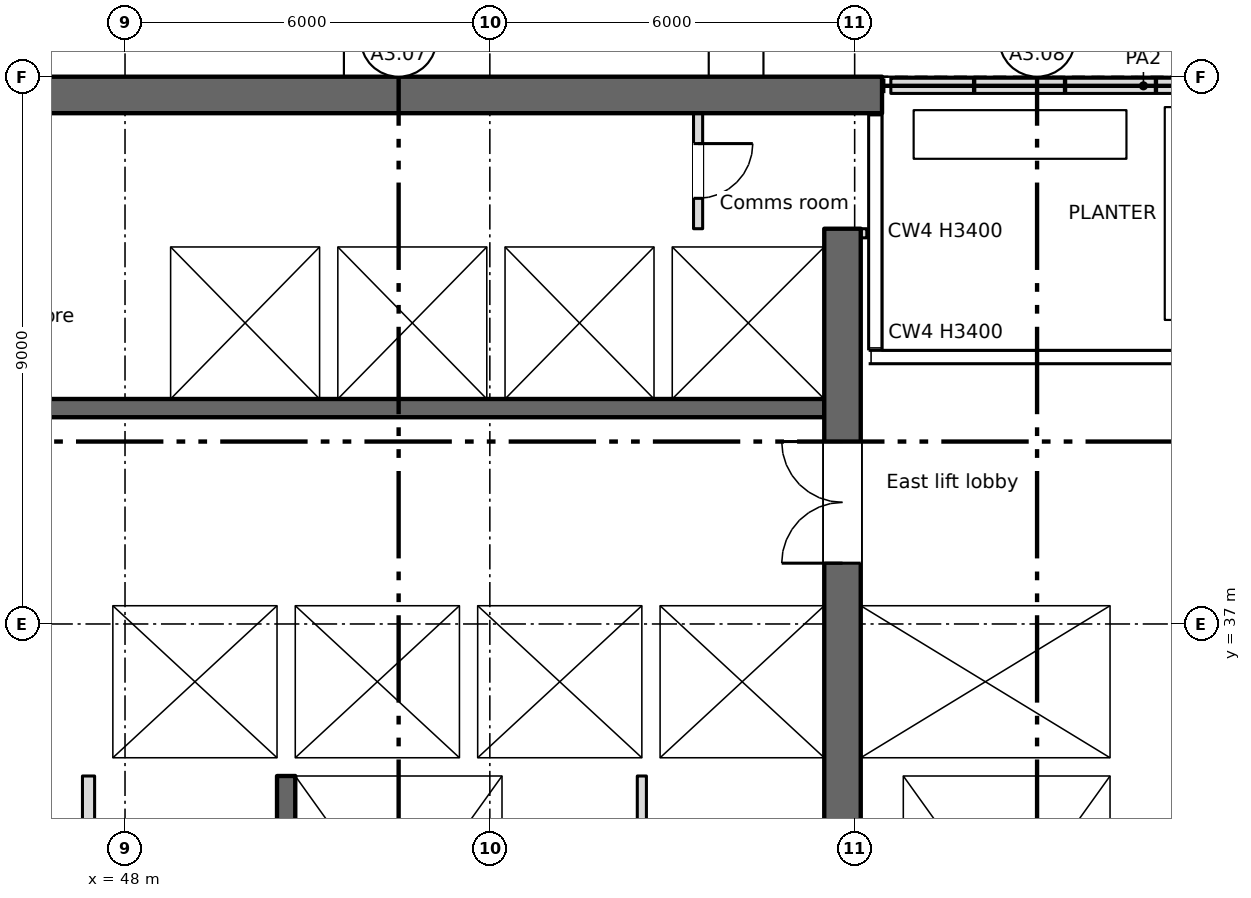
"""IFC4 building model, lengths in metres.
Left out: names, types, materials, properties, quantities, classifications, styles, units other than length and angle.
Written with IfcOpenShell. Run it as: python <this file> out.ifc"""

import sys

from ifc_helpers import new_model, si_unit, direction, frame, frame_2d, origin, place, context, subcontext, project, spatial, rectangle, extrude, element, fill, save


model = new_model("IFC4")
c1 = context("Model", 3, precision=1e-05, world=origin(), true_north=direction((0.0, 1.0)))
c2 = subcontext(c1, "Body", "Model", "MODEL_VIEW")
j1 = project(units=[si_unit("LENGTHUNIT", "METRE"), si_unit("PLANEANGLEUNIT", "RADIAN")], contexts=[c1])
p1 = place(None, origin())
s1 = spatial("IfcSite", under=j1, at=p1, CompositionType="ELEMENT")
p2 = place(p1, origin())
s2 = spatial("IfcBuilding", under=s1, at=p2, CompositionType="ELEMENT")
p3 = place(p2, frame((0.0, 0.0, 231.75)))
s3 = spatial("IfcBuildingStorey", under=s2, at=p3, CompositionType="ELEMENT", Elevation=231.75)
p4 = place(p3, frame((11.55, 45.7, 0.0), z_axis=(0.0, 0.0, 1.0), x_axis=(1.0, 0.0, 0.0)))
e1 = element("IfcWall", 1, at=p4, inside=s3, PredefinedType="SHEAR", context=c2, shape_type="SweptSolid", body=[
    extrude(rectangle(XDim=48.9, YDim=0.6, at=frame_2d((24.45, 0.0))), origin(), (0.0, 0.0, 1.0), 3.4),
])
p5 = place(p4, frame((1.2, 0.0, 0.6)))
e2 = element("IfcOpeningElement", 2, at=p5, cuts=e1, PredefinedType="OPENING", context=c2, shape_type="SweptSolid", body=[
    extrude(rectangle(XDim=0.6, YDim=2.4, at=frame_2d((0.3, 1.2))), frame((0.0, 0.31, 0.0), z_axis=(0.0, -1.0, 0.0), x_axis=(1.0, 0.0, 0.0)), (0.0, 0.0, 1.0), 0.62),
])
p6 = place(p3, frame((60.595, 45.85, 0.0), z_axis=(0.0, 0.0, 1.0), x_axis=(1.0, 0.0, 0.0)))
e3 = element("IfcWall", 3, at=p6, inside=s3, PredefinedType="PARAPET", context=c2, shape_type="SweptSolid", body=[
    extrude(rectangle(XDim=5.73, YDim=0.25, at=frame_2d((2.865, 0.0))), origin(), (0.0, 0.0, 1.0), 0.3),
])
p7 = place(p3, frame((64.35, 34.8, 0.0), z_axis=(0.0, 0.0, 1.0), x_axis=(0.0, 1.0, 0.0)))
e4 = element("IfcWall", 4, at=p7, inside=s3, PredefinedType="SHEAR", context=c2, shape_type="SweptSolid", body=[
    extrude(rectangle(XDim=6.45, YDim=0.3, at=frame_2d((3.225, 0.0))), origin(), (0.0, 0.0, 1.0), 3.4),
])
p8 = place(p3, frame((59.8, 28.4, 0.0), z_axis=(0.0, 0.0, 1.0), x_axis=(0.0, 1.0, 0.0)))
e5 = element("IfcWall", 5, at=p8, inside=s3, PredefinedType="SHEAR", context=c2, shape_type="SweptSolid", body=[
    extrude(rectangle(XDim=15.1, YDim=0.6, at=frame_2d((7.55, 0.0))), origin(), (0.0, 0.0, 1.0), 3.4),
])
p9 = place(p8, frame((9.6, 0.0, 0.0)))
e6 = element("IfcOpeningElement", 6, at=p9, cuts=e5, PredefinedType="OPENING", context=c2, shape_type="SweptSolid", body=[
    extrude(rectangle(XDim=2.0, YDim=2.1, at=frame_2d((1.0, 1.05))), frame((0.0, 0.31, 0.0), z_axis=(0.0, -1.0, 0.0), x_axis=(1.0, 0.0, 0.0)), (0.0, 0.0, 1.0), 0.62),
])
p10 = place(p3, frame((50.65, 34.5, 0.0), z_axis=(0.0, 0.0, 1.0), x_axis=(0.0, -1.0, 0.0)))
e7 = element("IfcWall", 7, at=p10, inside=s3, PredefinedType="SHEAR", context=c2, shape_type="SweptSolid", body=[
    extrude(rectangle(XDim=6.1, YDim=0.3, at=frame_2d((3.05, 0.0))), origin(), (0.0, 0.0, 1.0), 3.4),
])
p11 = place(p10, frame((4.95, 0.0, 0.0)))
e8 = element("IfcOpeningElement", 8, at=p11, cuts=e7, PredefinedType="OPENING", context=c2, shape_type="SweptSolid", body=[
    extrude(rectangle(XDim=1.1, YDim=2.1, at=frame_2d((0.55, 1.05))), frame((0.0, 0.16, 0.0), z_axis=(0.0, -1.0, 0.0), x_axis=(1.0, 0.0, 0.0)), (0.0, 0.0, 1.0), 0.32),
])
p12 = place(p3, frame((54.35, 28.4, 0.0), z_axis=(0.0, 0.0, 1.0), x_axis=(0.0, 1.0, 0.0)))
e9 = element("IfcWall", 9, at=p12, inside=s3, PredefinedType="SHEAR", context=c2, shape_type="SweptSolid", body=[
    extrude(rectangle(XDim=6.1, YDim=0.3, at=frame_2d((3.05, 0.0))), origin(), (0.0, 0.0, 1.0), 3.4),
])
p13 = place(p3, frame((60.45, 28.4, 0.0), z_axis=(0.0, 0.0, 1.0), x_axis=(0.0, 1.0, 0.0)))
e10 = element("IfcWall", 10, at=p13, inside=s3, PredefinedType="SHEAR", context=c2, shape_type="SweptSolid", body=[
    extrude(rectangle(XDim=6.1, YDim=0.7, at=frame_2d((3.05, 0.0))), origin(), (0.0, 0.0, 1.0), 3.4),
])
p14 = place(p3, frame((64.35, 28.4, 0.0), z_axis=(0.0, 0.0, 1.0), x_axis=(0.0, 1.0, 0.0)))
e11 = element("IfcWall", 11, at=p14, inside=s3, PredefinedType="SHEAR", context=c2, shape_type="SweptSolid", body=[
    extrude(rectangle(XDim=6.1, YDim=0.3, at=frame_2d((3.05, 0.0))), origin(), (0.0, 0.0, 1.0), 3.4),
])
p15 = place(p3, frame((47.3, 34.65, 0.0), z_axis=(0.0, 0.0, 1.0), x_axis=(1.0, 0.0, 0.0)))
e12 = element("IfcWall", 12, at=p15, inside=s3, PredefinedType="SHEAR", context=c2, shape_type="SweptSolid", body=[
    extrude(rectangle(XDim=12.2, YDim=0.3, at=frame_2d((6.1, 0.0))), origin(), (0.0, 0.0, 1.0), 3.4),
])
p16 = place(p15, frame((1.3, 0.0, 0.0)))
e13 = element("IfcOpeningElement", 13, at=p16, cuts=e12, PredefinedType="OPENING", context=c2, shape_type="SweptSolid", body=[
    extrude(rectangle(XDim=1.1, YDim=2.1, at=frame_2d((0.55, 1.05))), frame((0.0, 0.16, 0.0), z_axis=(0.0, -1.0, 0.0), x_axis=(1.0, 0.0, 0.0)), (0.0, 0.0, 1.0), 0.32),
])
p17 = place(p3, frame((60.1, 34.65, 0.0), z_axis=(0.0, 0.0, 1.0), x_axis=(1.0, 0.0, 0.0)))
e14 = element("IfcWall", 14, at=p17, inside=s3, PredefinedType="SHEAR", context=c2, shape_type="SweptSolid", body=[
    extrude(rectangle(XDim=4.4, YDim=0.3, at=frame_2d((2.2, 0.0))), origin(), (0.0, 0.0, 1.0), 3.4),
])
p18 = place(p3, frame((47.3, 37.45, 0.0), z_axis=(0.0, 0.0, 1.0), x_axis=(1.0, 0.0, 0.0)))
e15 = element("IfcWall", 15, at=p18, inside=s3, PredefinedType="SHEAR", context=c2, shape_type="SweptSolid", body=[
    extrude(rectangle(XDim=12.2, YDim=0.3, at=frame_2d((6.1, 0.0))), origin(), (0.0, 0.0, 1.0), 3.4),
])
p19 = place(p18, frame((4.3, 0.0, 0.0)))
e16 = element("IfcOpeningElement", 16, at=p19, cuts=e15, PredefinedType="OPENING", context=c2, shape_type="SweptSolid", body=[
    extrude(rectangle(XDim=1.1, YDim=2.1, at=frame_2d((0.55, 1.05))), frame((0.0, 0.16, 0.0), z_axis=(0.0, -1.0, 0.0), x_axis=(1.0, 0.0, 0.0)), (0.0, 0.0, 1.0), 0.32),
])
p20 = place(p18, frame((7.3, 0.0, 0.0)))
e17 = element("IfcOpeningElement", 17, at=p20, cuts=e15, PredefinedType="OPENING", context=c2, shape_type="SweptSolid", body=[
    extrude(rectangle(XDim=1.1, YDim=2.1, at=frame_2d((0.55, 1.05))), frame((0.0, 0.16, 0.0), z_axis=(0.0, -1.0, 0.0), x_axis=(1.0, 0.0, 0.0)), (0.0, 0.0, 1.0), 0.32),
])
p21 = place(p18, frame((10.3, 0.0, 0.0)))
e18 = element("IfcOpeningElement", 18, at=p21, cuts=e15, PredefinedType="OPENING", context=c2, shape_type="SweptSolid", body=[
    extrude(rectangle(XDim=1.1, YDim=2.1, at=frame_2d((0.55, 1.05))), frame((0.0, 0.16, 0.0), z_axis=(0.0, -1.0, 0.0), x_axis=(1.0, 0.0, 0.0)), (0.0, 0.0, 1.0), 0.32),
])
p22 = place(p3, frame((60.1, 37.45, 0.0), z_axis=(0.0, 0.0, 1.0), x_axis=(1.0, 0.0, 0.0)))
e19 = element("IfcWall", 19, at=p22, inside=s3, PredefinedType="SHEAR", context=c2, shape_type="SweptSolid", body=[
    extrude(rectangle(XDim=4.1, YDim=0.3, at=frame_2d((2.05, 0.0))), origin(), (0.0, 0.0, 1.0), 3.4),
])
p23 = place(p22, frame((1.5, 0.0, 0.0)))
e20 = element("IfcOpeningElement", 20, at=p23, cuts=e19, PredefinedType="OPENING", context=c2, shape_type="SweptSolid", body=[
    extrude(rectangle(XDim=1.1, YDim=2.1, at=frame_2d((0.55, 1.05))), frame((0.0, 0.16, 0.0), z_axis=(0.0, -1.0, 0.0), x_axis=(1.0, 0.0, 0.0)), (0.0, 0.0, 1.0), 0.32),
])
p24 = place(p3, frame((47.55, 34.8, 0.0), z_axis=(0.0, 0.0, 1.0), x_axis=(0.0, 1.0, 0.0)))
e21 = element("IfcWall", 21, at=p24, inside=s3, PredefinedType="SHEAR", context=c2, shape_type="SweptSolid", body=[
    extrude(rectangle(XDim=2.5, YDim=0.5, at=frame_2d((1.25, 0.0))), origin(), (0.0, 0.0, 1.0), 3.4),
])
p25 = place(p3, frame((50.65, 34.8, 0.0), z_axis=(0.0, 0.0, 1.0), x_axis=(0.0, 1.0, 0.0)))
e22 = element("IfcWall", 22, at=p25, inside=s3, PredefinedType="SHEAR", context=c2, shape_type="SweptSolid", body=[
    extrude(rectangle(XDim=2.5, YDim=0.3, at=frame_2d((1.25, 0.0))), origin(), (0.0, 0.0, 1.0), 3.4),
])
p26 = place(p3, frame((18.5, 40.55, 0.0), z_axis=(0.0, 0.0, 1.0), x_axis=(1.0, 0.0, 0.0)))
e23 = element("IfcWall", 23, at=p26, inside=s3, PredefinedType="SHEAR", context=c2, shape_type="SweptSolid", body=[
    extrude(rectangle(XDim=41.0, YDim=0.3, at=frame_2d((20.5, 0.0))), origin(), (0.0, 0.0, 1.0), 3.4),
])
p27 = place(p26, frame((2.15, 0.0, 0.0)))
e24 = element("IfcOpeningElement", 24, at=p27, cuts=e23, PredefinedType="OPENING", context=c2, shape_type="SweptSolid", body=[
    extrude(rectangle(XDim=0.9, YDim=2.1, at=frame_2d((0.45, 1.05))), frame((0.0, 0.16, 0.0), z_axis=(0.0, -1.0, 0.0), x_axis=(1.0, 0.0, 0.0)), (0.0, 0.0, 1.0), 0.32),
])
p28 = place(p26, frame((15.9, 0.0, 0.0)))
e25 = element("IfcOpeningElement", 25, at=p28, cuts=e23, PredefinedType="OPENING", context=c2, shape_type="SweptSolid", body=[
    extrude(rectangle(XDim=0.9, YDim=2.1, at=frame_2d((0.45, 1.05))), frame((0.0, 0.16, 0.0), z_axis=(0.0, -1.0, 0.0), x_axis=(1.0, 0.0, 0.0)), (0.0, 0.0, 1.0), 0.32),
])
p29 = place(p26, frame((21.4, 0.0, 0.0)))
e26 = element("IfcOpeningElement", 26, at=p29, cuts=e23, PredefinedType="OPENING", context=c2, shape_type="SweptSolid", body=[
    extrude(rectangle(XDim=0.9, YDim=2.1, at=frame_2d((0.45, 1.05))), frame((0.0, 0.16, 0.0), z_axis=(0.0, -1.0, 0.0), x_axis=(1.0, 0.0, 0.0)), (0.0, 0.0, 1.0), 0.32),
])
p30 = place(p26, frame((26.9, 0.0, 0.0)))
e27 = element("IfcOpeningElement", 27, at=p30, cuts=e23, PredefinedType="OPENING", context=c2, shape_type="SweptSolid", body=[
    extrude(rectangle(XDim=0.9, YDim=2.1, at=frame_2d((0.45, 1.05))), frame((0.0, 0.16, 0.0), z_axis=(0.0, -1.0, 0.0), x_axis=(1.0, 0.0, 0.0)), (0.0, 0.0, 1.0), 0.32),
])
p31 = place(p26, frame((6.175, 0.0, 0.0)))
e28 = element("IfcOpeningElement", 28, at=p31, cuts=e23, PredefinedType="OPENING", context=c2, shape_type="SweptSolid", body=[
    extrude(rectangle(XDim=1.1, YDim=2.1, at=frame_2d((0.55, 1.05))), frame((0.0, 0.16, 0.0), z_axis=(0.0, -1.0, 0.0), x_axis=(1.0, 0.0, 0.0)), (0.0, 0.0, 1.0), 0.32),
])
p32 = place(p26, frame((8.925, 0.0, 0.0)))
e29 = element("IfcOpeningElement", 29, at=p32, cuts=e23, PredefinedType="OPENING", context=c2, shape_type="SweptSolid", body=[
    extrude(rectangle(XDim=1.1, YDim=2.1, at=frame_2d((0.55, 1.05))), frame((0.0, 0.16, 0.0), z_axis=(0.0, -1.0, 0.0), x_axis=(1.0, 0.0, 0.0)), (0.0, 0.0, 1.0), 0.32),
])
p33 = place(p26, frame((11.675, 0.0, 0.0)))
e30 = element("IfcOpeningElement", 30, at=p33, cuts=e23, PredefinedType="OPENING", context=c2, shape_type="SweptSolid", body=[
    extrude(rectangle(XDim=1.1, YDim=2.1, at=frame_2d((0.55, 1.05))), frame((0.0, 0.16, 0.0), z_axis=(0.0, -1.0, 0.0), x_axis=(1.0, 0.0, 0.0)), (0.0, 0.0, 1.0), 0.32),
])
p34 = place(p26, frame((30.925, 0.0, 0.0)))
e31 = element("IfcOpeningElement", 31, at=p34, cuts=e23, PredefinedType="OPENING", context=c2, shape_type="SweptSolid", body=[
    extrude(rectangle(XDim=1.1, YDim=2.1, at=frame_2d((0.55, 1.05))), frame((0.0, 0.16, 0.0), z_axis=(0.0, -1.0, 0.0), x_axis=(1.0, 0.0, 0.0)), (0.0, 0.0, 1.0), 0.32),
])
p35 = place(p26, frame((33.675, 0.0, 0.0)))
e32 = element("IfcOpeningElement", 32, at=p35, cuts=e23, PredefinedType="OPENING", context=c2, shape_type="SweptSolid", body=[
    extrude(rectangle(XDim=1.1, YDim=2.1, at=frame_2d((0.55, 1.05))), frame((0.0, 0.16, 0.0), z_axis=(0.0, -1.0, 0.0), x_axis=(1.0, 0.0, 0.0)), (0.0, 0.0, 1.0), 0.32),
])
p36 = place(p26, frame((36.375, 0.0, 0.0)))
e33 = element("IfcOpeningElement", 33, at=p36, cuts=e23, PredefinedType="OPENING", context=c2, shape_type="SweptSolid", body=[
    extrude(rectangle(XDim=1.2, YDim=2.1, at=frame_2d((0.6, 1.05))), frame((0.0, 0.16, 0.0), z_axis=(0.0, -1.0, 0.0), x_axis=(1.0, 0.0, 0.0)), (0.0, 0.0, 1.0), 0.32),
])
p37 = place(p26, frame((39.15, 0.0, 0.0)))
e34 = element("IfcOpeningElement", 34, at=p37, cuts=e23, PredefinedType="OPENING", context=c2, shape_type="SweptSolid", body=[
    extrude(rectangle(XDim=1.2, YDim=2.1, at=frame_2d((0.6, 1.05))), frame((0.0, 0.16, 0.0), z_axis=(0.0, -1.0, 0.0), x_axis=(1.0, 0.0, 0.0)), (0.0, 0.0, 1.0), 0.32),
])
p38 = place(p3, frame((18.5, 43.35, 0.0), z_axis=(0.0, 0.0, 1.0), x_axis=(1.0, 0.0, 0.0)))
e35 = element("IfcWall", 35, at=p38, inside=s3, PredefinedType="SHEAR", context=c2, shape_type="SweptSolid", body=[
    extrude(rectangle(XDim=41.0, YDim=0.3, at=frame_2d((20.5, 0.0))), origin(), (0.0, 0.0, 1.0), 3.4),
])
for number, where, z_axis, x_axis in (
    (36, (53.65, 34.8, 0.0), (0.0, 0.0, 1.0), (0.0, 1.0, 0.0)),
    (37, (56.65, 34.8, 0.0), (0.0, 0.0, 1.0), (0.0, 1.0, 0.0)),
    (38, (48.6, 40.7, 0.0), (0.0, 0.0, 1.0), (0.0, 1.0, 0.0)),
    (39, (51.35, 40.7, 0.0), (0.0, 0.0, 1.0), (0.0, 1.0, 0.0)),
    (40, (54.1, 40.7, 0.0), (0.0, 0.0, 1.0), (0.0, 1.0, 0.0)),
    (41, (56.85, 40.7, 0.0), (0.0, 0.0, 1.0), (0.0, 1.0, 0.0)),
):
    element("IfcWall", number, at=place(p3, frame(where, z_axis=z_axis, x_axis=x_axis)), inside=s3, PredefinedType="SHEAR", context=c2, shape_type="SweptSolid", body=[
        extrude(rectangle(XDim=2.5, YDim=0.3, at=frame_2d((1.25, 0.0))), origin(), (0.0, 0.0, 1.0), 3.4),
    ])
p39 = place(p3, frame((47.4, 28.4, 0.0), z_axis=(0.0, 0.0, 1.0), x_axis=(0.0, 1.0, 0.0)))
e42 = element("IfcWall", 42, at=p39, inside=s3, PredefinedType="PARTITIONING", context=c2, shape_type="SweptSolid", body=[
    extrude(rectangle(XDim=6.1, YDim=0.2, at=frame_2d((3.05, 0.0))), origin(), (0.0, 0.0, 1.0), 3.4),
])
p40 = place(p3, frame((56.5, 28.4, 0.0), z_axis=(0.0, 0.0, 1.0), x_axis=(0.0, 1.0, 0.0)))
e43 = element("IfcWall", 43, at=p40, inside=s3, PredefinedType="PARTITIONING", context=c2, shape_type="SweptSolid", body=[
    extrude(rectangle(XDim=6.1, YDim=0.15, at=frame_2d((3.05, 0.0))), origin(), (0.0, 0.0, 1.0), 3.4),
])
p41 = place(p3, frame((57.425, 45.4, 0.0), z_axis=(0.0, 0.0, 1.0), x_axis=(0.0, -1.0, 0.0)))
e44 = element("IfcWall", 44, at=p41, inside=s3, PredefinedType="PARTITIONING", context=c2, shape_type="SweptSolid", body=[
    extrude(rectangle(XDim=1.9, YDim=0.15, at=frame_2d((0.95, 0.0))), origin(), (0.0, 0.0, 1.0), 3.4),
])
p42 = place(p41, frame((0.5, 0.0, 0.0)))
e45 = element("IfcOpeningElement", 45, at=p42, cuts=e44, PredefinedType="OPENING", context=c2, shape_type="SweptSolid", body=[
    extrude(rectangle(XDim=0.9, YDim=2.1, at=frame_2d((0.45, 1.05))), frame((0.0, 0.085, 0.0), z_axis=(0.0, -1.0, 0.0), x_axis=(1.0, 0.0, 0.0)), (0.0, 0.0, 1.0), 0.17),
])
p43 = place(p3, frame((60.15, 43.35, 0.0), z_axis=(0.0, 0.0, 1.0), x_axis=(0.0, 1.0, 0.0)))
e46 = element("IfcWall", 46, at=p43, inside=s3, PredefinedType="PARTITIONING", context=c2, shape_type="SweptSolid", body=[
    extrude(rectangle(XDim=0.15, YDim=0.1, at=frame_2d((0.075, 0.0))), origin(), (0.0, 0.0, 1.0), 3.4),
])
p44 = place(p42, origin())
e47 = element("IfcDoor", 47, at=p44, inside=s3, OperationType="SINGLE_SWING_LEFT", PredefinedType="DOOR", context=c2, shape_type="SweptSolid", body=[
    extrude(rectangle(XDim=0.9, YDim=2.1, at=frame_2d((0.45, 1.05))), frame((0.0, 0.025, 0.0), z_axis=(0.0, -1.0, 0.0), x_axis=(1.0, 0.0, 0.0)), (0.0, 0.0, 1.0), 0.05),
])
fill(e45, e47)
p45 = place(p19, origin())
e48 = element("IfcDoor", 48, at=p45, inside=s3, OperationType="SLIDING_TO_LEFT", PredefinedType="DOOR", context=c2, shape_type="SweptSolid", body=[
    extrude(rectangle(XDim=1.1, YDim=2.1, at=frame_2d((0.55, 1.05))), frame((0.0, 0.025, 0.0), z_axis=(0.0, -1.0, 0.0), x_axis=(1.0, 0.0, 0.0)), (0.0, 0.0, 1.0), 0.05),
])
fill(e16, e48)
p46 = place(p20, origin())
e49 = element("IfcDoor", 49, at=p46, inside=s3, OperationType="SLIDING_TO_LEFT", PredefinedType="DOOR", context=c2, shape_type="SweptSolid", body=[
    extrude(rectangle(XDim=1.1, YDim=2.1, at=frame_2d((0.55, 1.05))), frame((0.0, 0.025, 0.0), z_axis=(0.0, -1.0, 0.0), x_axis=(1.0, 0.0, 0.0)), (0.0, 0.0, 1.0), 0.05),
])
fill(e17, e49)
p47 = place(p21, origin())
e50 = element("IfcDoor", 50, at=p47, inside=s3, OperationType="SLIDING_TO_LEFT", PredefinedType="DOOR", context=c2, shape_type="SweptSolid", body=[
    extrude(rectangle(XDim=1.1, YDim=2.1, at=frame_2d((0.55, 1.05))), frame((0.0, 0.025, 0.0), z_axis=(0.0, -1.0, 0.0), x_axis=(1.0, 0.0, 0.0)), (0.0, 0.0, 1.0), 0.05),
])
fill(e18, e50)
p48 = place(p34, origin())
e51 = element("IfcDoor", 51, at=p48, inside=s3, OperationType="SLIDING_TO_LEFT", PredefinedType="DOOR", context=c2, shape_type="SweptSolid", body=[
    extrude(rectangle(XDim=1.1, YDim=2.1, at=frame_2d((0.55, 1.05))), frame((0.0, 0.025, 0.0), z_axis=(0.0, -1.0, 0.0), x_axis=(1.0, 0.0, 0.0)), (0.0, 0.0, 1.0), 0.05),
])
fill(e31, e51)
p49 = place(p35, origin())
e52 = element("IfcDoor", 52, at=p49, inside=s3, OperationType="SLIDING_TO_LEFT", PredefinedType="DOOR", context=c2, shape_type="SweptSolid", body=[
    extrude(rectangle(XDim=1.1, YDim=2.1, at=frame_2d((0.55, 1.05))), frame((0.0, 0.025, 0.0), z_axis=(0.0, -1.0, 0.0), x_axis=(1.0, 0.0, 0.0)), (0.0, 0.0, 1.0), 0.05),
])
fill(e32, e52)
p50 = place(p36, origin())
e53 = element("IfcDoor", 53, at=p50, inside=s3, OperationType="SLIDING_TO_LEFT", PredefinedType="DOOR", context=c2, shape_type="SweptSolid", body=[
    extrude(rectangle(XDim=1.2, YDim=2.1, at=frame_2d((0.6, 1.05))), frame((0.0, 0.025, 0.0), z_axis=(0.0, -1.0, 0.0), x_axis=(1.0, 0.0, 0.0)), (0.0, 0.0, 1.0), 0.05),
])
fill(e33, e53)
p51 = place(p37, origin())
e54 = element("IfcDoor", 54, at=p51, inside=s3, OperationType="SLIDING_TO_LEFT", PredefinedType="DOOR", context=c2, shape_type="SweptSolid", body=[
    extrude(rectangle(XDim=1.2, YDim=2.1, at=frame_2d((0.6, 1.05))), frame((0.0, 0.025, 0.0), z_axis=(0.0, -1.0, 0.0), x_axis=(1.0, 0.0, 0.0)), (0.0, 0.0, 1.0), 0.05),
])
fill(e34, e54)
p52 = place(p23, origin())
e55 = element("IfcDoor", 55, at=p52, inside=s3, OperationType="SLIDING_TO_LEFT", PredefinedType="DOOR", context=c2, shape_type="SweptSolid", body=[
    extrude(rectangle(XDim=1.1, YDim=2.1, at=frame_2d((0.55, 1.05))), frame((0.0, 0.025, 0.0), z_axis=(0.0, -1.0, 0.0), x_axis=(1.0, 0.0, 0.0)), (0.0, 0.0, 1.0), 0.05),
])
fill(e20, e55)
p53 = place(p16, origin())
e56 = element("IfcDoor", 56, at=p53, inside=s3, OperationType="SLIDING_TO_LEFT", PredefinedType="DOOR", context=c2, shape_type="SweptSolid", body=[
    extrude(rectangle(XDim=1.1, YDim=2.1, at=frame_2d((0.55, 1.05))), frame((0.0, 0.025, 0.0), z_axis=(0.0, -1.0, 0.0), x_axis=(1.0, 0.0, 0.0)), (0.0, 0.0, 1.0), 0.05),
])
fill(e13, e56)
p54 = place(p9, origin())
e57 = element("IfcDoor", 57, at=p54, inside=s3, OperationType="DOUBLE_DOOR_SINGLE_SWING", PredefinedType="DOOR", context=c2, shape_type="SweptSolid", body=[
    extrude(rectangle(XDim=2.0, YDim=2.1, at=frame_2d((1.0, 1.05))), frame((0.0, 0.025, 0.0), z_axis=(0.0, -1.0, 0.0), x_axis=(1.0, 0.0, 0.0)), (0.0, 0.0, 1.0), 0.05),
])
fill(e6, e57)
save(model, sys.argv[1])
